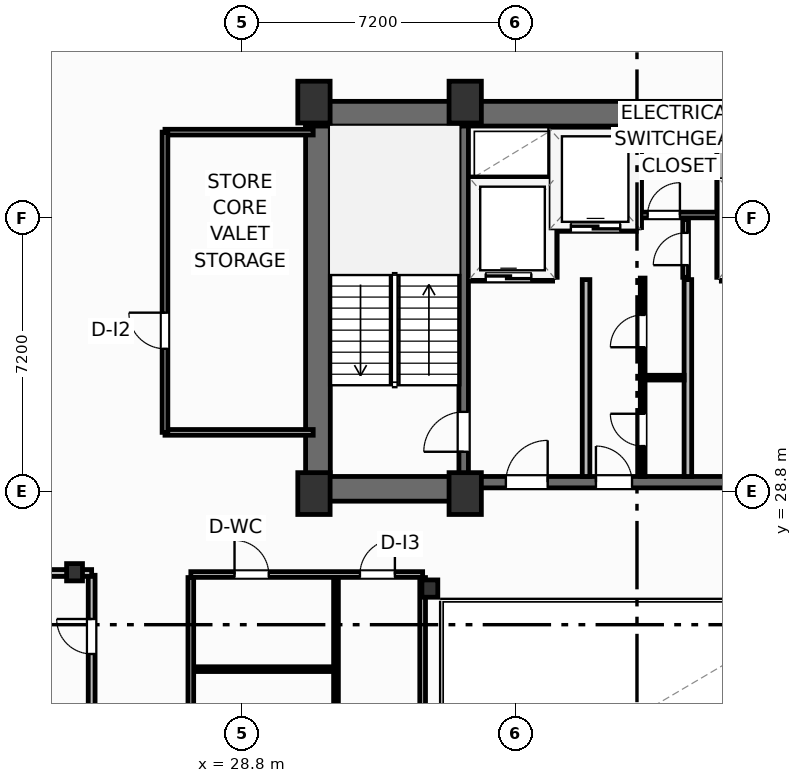
"""IFC4 building model, lengths in metres.
Left out: names, types, materials, properties, quantities, classifications, styles, units other than length and angle.
Written with IfcOpenShell. Run it as: python <this file> out.ifc"""

import sys

from ifc_helpers import new_model, si_unit, direction, frame, frame_2d, origin, origin_2d, place, context, subcontext, project, spatial, rectangle, i_section, extrude, element, fill, save


model = new_model("IFC4")
c1 = context("Model", 3, precision=1e-05, world=origin(), true_north=direction((0.0, 1.0)))
c2 = subcontext(c1, "Body", "Model", "MODEL_VIEW")
j1 = project(units=[si_unit("LENGTHUNIT", "METRE"), si_unit("PLANEANGLEUNIT", "RADIAN")], contexts=[c1])
p1 = place(None, origin())
s1 = spatial("IfcSite", under=j1, at=p1, CompositionType="ELEMENT")
p2 = place(p1, origin())
s2 = spatial("IfcBuilding", under=s1, at=p2, CompositionType="ELEMENT")
p3 = place(p2, frame((0.0, 0.0, 185.7)))
s3 = spatial("IfcBuildingStorey", under=s2, at=p3, CompositionType="ELEMENT", Elevation=185.7)
for number, where, z_axis, x_axis in (
    (1, (30.7, 28.75, 0.0), (0.0, 0.0, 1.0), (1.0, 0.0, 0.0)),
    (2, (34.68, 28.75, 0.0), (0.0, 0.0, 1.0), (1.0, 0.0, 0.0)),
    (3, (30.7, 39.05, 0.0), (0.0, 0.0, 1.0), (1.0, 0.0, 0.0)),
    (4, (34.68, 39.05, 0.0), (0.0, 0.0, 1.0), (1.0, 0.0, 0.0)),
):
    element("IfcColumn", number, at=place(p3, frame(where, z_axis=z_axis, x_axis=x_axis)), inside=s3, PredefinedType="COLUMN", context=c2, shape_type="SweptSolid", body=[
        extrude(rectangle(XDim=0.85, YDim=1.1, at=origin_2d()), origin(), (0.0, 0.0, 1.0), 3.7),
    ])
for number, where, z_axis, x_axis in (
    (5, (33.75, 26.25, 0.0), (0.0, 0.0, 1.0), (1.0, 0.0, 0.0)),
    (6, (24.4, 26.68, 0.0), (0.0, 0.0, 1.0), (1.0, 0.0, 0.0)),
):
    element("IfcColumn", number, at=place(p3, frame(where, z_axis=z_axis, x_axis=x_axis)), inside=s3, PredefinedType="COLUMN", context=c2, shape_type="SweptSolid", body=[
        extrude(i_section(OverallWidth=0.418, OverallDepth=0.455, WebThickness=0.042, FlangeThickness=0.068, FilletRadius=0.025, at=origin_2d()), origin(), (0.0, 0.0, 1.0), 3.7),
    ])
p4 = place(p3, frame((30.48, 38.745, 0.0), z_axis=(0.0, 0.0, 1.0), x_axis=(1.0, 0.0, 0.0)))
e7 = element("IfcWall", 7, at=p4, inside=s3, PredefinedType="SHEAR", context=c2, shape_type="SweptSolid", body=[
    extrude(rectangle(XDim=17.44, YDim=0.65, at=frame_2d((8.72, 0.0))), origin(), (0.0, 0.0, 1.0), 3.45),
])
p5 = place(p3, frame((30.805, 29.2, 0.0), z_axis=(0.0, 0.0, 1.0), x_axis=(0.0, 1.0, 0.0)))
e8 = element("IfcWall", 8, at=p5, inside=s3, PredefinedType="SHEAR", context=c2, shape_type="SweptSolid", body=[
    extrude(rectangle(XDim=9.22, YDim=0.65, at=frame_2d((4.61, 0.0))), origin(), (0.0, 0.0, 1.0), 3.45),
])
p6 = place(p3, frame((30.48, 28.875, 0.0), z_axis=(0.0, 0.0, 1.0), x_axis=(1.0, 0.0, 0.0)))
e9 = element("IfcWall", 9, at=p6, inside=s3, PredefinedType="SHEAR", context=c2, shape_type="SweptSolid", body=[
    extrude(rectangle(XDim=4.32, YDim=0.65, at=frame_2d((2.16, 0.0))), origin(), (0.0, 0.0, 1.0), 3.45),
])
p7 = place(p3, frame((34.8, 29.05, 0.0), z_axis=(0.0, 0.0, 1.0), x_axis=(1.0, 0.0, 0.0)))
e10 = element("IfcWall", 10, at=p7, inside=s3, PredefinedType="SHEAR", context=c2, shape_type="SweptSolid", body=[
    extrude(rectangle(XDim=8.8, YDim=0.3, at=frame_2d((4.4, 0.0))), origin(), (0.0, 0.0, 1.0), 3.45),
])
p8 = place(p7, frame((0.95, 0.0, 0.0)))
e11 = element("IfcOpeningElement", 11, at=p8, cuts=e10, PredefinedType="OPENING", context=c2, shape_type="SweptSolid", body=[
    extrude(rectangle(XDim=1.1, YDim=2.15, at=frame_2d((0.55, 1.075))), frame((0.0, 0.16, 0.0), z_axis=(0.0, -1.0, 0.0), x_axis=(1.0, 0.0, 0.0)), (0.0, 0.0, 1.0), 0.32),
])
p9 = place(p7, frame((6.75, 0.0, 0.0)))
e12 = element("IfcOpeningElement", 12, at=p9, cuts=e10, PredefinedType="OPENING", context=c2, shape_type="SweptSolid", body=[
    extrude(rectangle(XDim=1.1, YDim=2.15, at=frame_2d((0.55, 1.075))), frame((0.0, 0.16, 0.0), z_axis=(0.0, -1.0, 0.0), x_axis=(1.0, 0.0, 0.0)), (0.0, 0.0, 1.0), 0.32),
])
p10 = place(p7, frame((3.32, 0.0, 0.0)))
e13 = element("IfcOpeningElement", 13, at=p10, cuts=e10, PredefinedType="OPENING", context=c2, shape_type="SweptSolid", body=[
    extrude(rectangle(XDim=0.95, YDim=2.15, at=frame_2d((0.475, 1.075))), frame((0.0, 0.16, 0.0), z_axis=(0.0, -1.0, 0.0), x_axis=(1.0, 0.0, 0.0)), (0.0, 0.0, 1.0), 0.32),
])
p11 = place(p3, frame((34.64, 29.2, 0.0), z_axis=(0.0, 0.0, 1.0), x_axis=(0.0, 1.0, 0.0)))
e14 = element("IfcWall", 14, at=p11, inside=s3, PredefinedType="SHEAR", context=c2, shape_type="SweptSolid", body=[
    extrude(rectangle(XDim=9.22, YDim=0.25, at=frame_2d((4.61, 0.0))), origin(), (0.0, 0.0, 1.0), 3.45),
])
p12 = place(p11, frame((0.65, 0.0, 0.0)))
e15 = element("IfcOpeningElement", 15, at=p12, cuts=e14, PredefinedType="OPENING", context=c2, shape_type="SweptSolid", body=[
    extrude(rectangle(XDim=1.05, YDim=2.15, at=frame_2d((0.525, 1.075))), frame((0.0, 0.135, 0.0), z_axis=(0.0, -1.0, 0.0), x_axis=(1.0, 0.0, 0.0)), (0.0, 0.0, 1.0), 0.27),
])
p13 = place(p3, frame((24.85, 23.03, 0.0), z_axis=(0.0, 0.0, 1.0), x_axis=(0.0, 1.0, 0.0)))
e16 = element("IfcWall", 16, at=p13, inside=s3, PredefinedType="PARTITIONING", context=c2, shape_type="SweptSolid", body=[
    extrude(rectangle(XDim=3.57, YDim=0.18, at=frame_2d((1.785, 0.0))), origin(), (0.0, 0.0, 1.0), 3.45),
])
p14 = place(p13, frame((1.5, 0.0, 0.0)))
e17 = element("IfcOpeningElement", 17, at=p14, cuts=e16, PredefinedType="OPENING", context=c2, shape_type="SweptSolid", body=[
    extrude(rectangle(XDim=0.92, YDim=2.05, at=frame_2d((0.46, 1.025))), frame((0.0, 0.1, 0.0), z_axis=(0.0, -1.0, 0.0), x_axis=(1.0, 0.0, 0.0)), (0.0, 0.0, 1.0), 0.2),
])
p15 = place(p3, frame((3.658, 26.66, 0.0), z_axis=(0.0, 0.0, 1.0), x_axis=(1.0, 0.0, 0.0)))
e18 = element("IfcWall", 18, at=p15, inside=s3, PredefinedType="PARTITIONING", context=c2, shape_type="SweptSolid", body=[
    extrude(rectangle(XDim=21.192, YDim=0.18, at=frame_2d((10.596, 0.0))), origin(), (0.0, 0.0, 1.0), 2.662),
])
for number, where, z_axis, x_axis in (
    (19, (37.86, 29.2, 0.0), (0.0, 0.0, 1.0), (0.0, 1.0, 0.0)),
    (20, (40.54, 29.2, 0.0), (0.0, 0.0, 1.0), (0.0, 1.0, 0.0)),
):
    element("IfcWall", number, at=place(p3, frame(where, z_axis=z_axis, x_axis=x_axis)), inside=s3, PredefinedType="PARTITIONING", context=c2, shape_type="SweptSolid", body=[
        extrude(rectangle(XDim=5.18, YDim=0.2, at=frame_2d((2.59, 0.0))), origin(), (0.0, 0.0, 1.0), 3.45),
    ])
p16 = place(p3, frame((34.8, 34.44, 0.0), z_axis=(0.0, 0.0, 1.0), x_axis=(1.0, 0.0, 0.0)))
e21 = element("IfcWall", 21, at=p16, inside=s3, PredefinedType="PARTITIONING", context=c2, shape_type="SweptSolid", body=[
    extrude(rectangle(XDim=2.18, YDim=0.2, at=frame_2d((1.09, 0.0))), origin(), (0.0, 0.0, 1.0), 3.45),
])
p17 = place(p16, frame((0.42, 0.0, 0.0)))
e22 = element("IfcOpeningElement", 22, at=p17, cuts=e21, PredefinedType="OPENING", context=c2, shape_type="SweptSolid", body=[
    extrude(rectangle(XDim=1.2, YDim=2.2, at=frame_2d((0.6, 1.1))), frame((0.0, 0.11, 0.0), z_axis=(0.0, -1.0, 0.0), x_axis=(1.0, 0.0, 0.0)), (0.0, 0.0, 1.0), 0.22),
])
p18 = place(p3, frame((34.8, 36.98, 0.0), z_axis=(0.0, 0.0, 1.0), x_axis=(1.0, 0.0, 0.0)))
e23 = element("IfcWall", 23, at=p18, inside=s3, PredefinedType="PARTITIONING", context=c2, shape_type="SweptSolid", body=[
    extrude(rectangle(XDim=2.18, YDim=0.2, at=frame_2d((1.09, 0.0))), origin(), (0.0, 0.0, 1.0), 3.45),
])
for number, where, z_axis, x_axis in (
    (24, (37.0, 34.44, 0.0), (0.0, 0.0, 1.0), (0.0, 1.0, 0.0)),
    (25, (41.4, 34.44, 0.0), (0.0, 0.0, 1.0), (0.0, 1.0, 0.0)),
):
    element("IfcWall", number, at=place(p3, frame(where, z_axis=z_axis, x_axis=x_axis)), inside=s3, PredefinedType="PARTITIONING", context=c2, shape_type="SweptSolid", body=[
        extrude(rectangle(XDim=3.9, YDim=0.2, at=frame_2d((1.95, 0.0))), origin(), (0.0, 0.0, 1.0), 3.45),
    ])
p19 = place(p3, frame((37.06, 35.75, 0.0), z_axis=(0.0, 0.0, 1.0), x_axis=(1.0, 0.0, 0.0)))
e26 = element("IfcWall", 26, at=p19, inside=s3, PredefinedType="PARTITIONING", context=c2, shape_type="SweptSolid", body=[
    extrude(rectangle(XDim=2.12, YDim=0.2, at=frame_2d((1.06, 0.0))), origin(), (0.0, 0.0, 1.0), 3.45),
])
p20 = place(p19, frame((0.4, 0.0, 0.0)))
e27 = element("IfcOpeningElement", 27, at=p20, cuts=e26, PredefinedType="OPENING", context=c2, shape_type="SweptSolid", body=[
    extrude(rectangle(XDim=1.3, YDim=2.2, at=frame_2d((0.65, 1.1))), frame((0.0, 0.11, 0.0), z_axis=(0.0, -1.0, 0.0), x_axis=(1.0, 0.0, 0.0)), (0.0, 0.0, 1.0), 0.22),
])
p21 = place(p3, frame((39.22, 35.75, 0.0), z_axis=(0.0, 0.0, 1.0), x_axis=(0.0, 1.0, 0.0)))
e28 = element("IfcWall", 28, at=p21, inside=s3, PredefinedType="PARTITIONING", context=c2, shape_type="SweptSolid", body=[
    extrude(rectangle(XDim=2.59, YDim=0.2, at=frame_2d((1.295, 0.0))), origin(), (0.0, 0.0, 1.0), 3.45),
])
p22 = place(p3, frame((39.3, 36.08, 0.0), z_axis=(0.0, 0.0, 1.0), x_axis=(1.0, 0.0, 0.0)))
e29 = element("IfcWall", 29, at=p22, inside=s3, PredefinedType="PARTITIONING", context=c2, shape_type="SweptSolid", body=[
    extrude(rectangle(XDim=2.02, YDim=0.15, at=frame_2d((1.01, 0.0))), origin(), (0.0, 0.0, 1.0), 3.45),
])
p23 = place(p22, frame((0.18, 0.0, 0.0)))
e30 = element("IfcOpeningElement", 30, at=p23, cuts=e29, PredefinedType="OPENING", context=c2, shape_type="SweptSolid", body=[
    extrude(rectangle(XDim=0.85, YDim=2.05, at=frame_2d((0.425, 1.025))), frame((0.0, 0.085, 0.0), z_axis=(0.0, -1.0, 0.0), x_axis=(1.0, 0.0, 0.0)), (0.0, 0.0, 1.0), 0.17),
])
p24 = place(p3, frame((40.48, 34.44, 0.0), z_axis=(0.0, 0.0, 1.0), x_axis=(0.0, 1.0, 0.0)))
e31 = element("IfcWall", 31, at=p24, inside=s3, PredefinedType="PARTITIONING", context=c2, shape_type="SweptSolid", body=[
    extrude(rectangle(XDim=1.52, YDim=0.15, at=frame_2d((0.76, 0.0))), origin(), (0.0, 0.0, 1.0), 3.45),
])
p25 = place(p24, frame((0.32, 0.0, 0.0)))
e32 = element("IfcOpeningElement", 32, at=p25, cuts=e31, PredefinedType="OPENING", context=c2, shape_type="SweptSolid", body=[
    extrude(rectangle(XDim=0.85, YDim=2.05, at=frame_2d((0.425, 1.025))), frame((0.0, 0.085, 0.0), z_axis=(0.0, -1.0, 0.0), x_axis=(1.0, 0.0, 0.0)), (0.0, 0.0, 1.0), 0.17),
])
p26 = place(p3, frame((39.35, 31.8, 0.0), z_axis=(0.0, 0.0, 1.0), x_axis=(1.0, 0.0, 0.0)))
e33 = element("IfcWall", 33, at=p26, inside=s3, PredefinedType="PARTITIONING", context=c2, shape_type="SweptSolid", body=[
    extrude(rectangle(XDim=1.09, YDim=0.125, at=frame_2d((0.545, 0.0))), origin(), (0.0, 0.0, 1.0), 3.45),
])
p27 = place(p3, frame((39.35, 29.2, 0.0), z_axis=(0.0, 0.0, 1.0), x_axis=(0.0, 1.0, 0.0)))
e34 = element("IfcWall", 34, at=p27, inside=s3, PredefinedType="PARTITIONING", context=c2, shape_type="SweptSolid", body=[
    extrude(rectangle(XDim=5.22, YDim=0.125, at=frame_2d((2.61, 0.0))), origin(), (0.0, 0.0, 1.0), 3.45),
])
p28 = place(p27, frame((0.8, 0.0, 0.0)))
e35 = element("IfcOpeningElement", 35, at=p28, cuts=e34, PredefinedType="OPENING", context=c2, shape_type="SweptSolid", body=[
    extrude(rectangle(XDim=0.85, YDim=2.05, at=frame_2d((0.425, 1.025))), frame((0.0, 0.073, 0.0), z_axis=(0.0, -1.0, 0.0), x_axis=(1.0, 0.0, 0.0)), (0.0, 0.0, 1.0), 0.145),
])
p29 = place(p27, frame((3.4, 0.0, 0.0)))
e36 = element("IfcOpeningElement", 36, at=p29, cuts=e34, PredefinedType="OPENING", context=c2, shape_type="SweptSolid", body=[
    extrude(rectangle(XDim=0.85, YDim=2.05, at=frame_2d((0.425, 1.025))), frame((0.0, 0.073, 0.0), z_axis=(0.0, -1.0, 0.0), x_axis=(1.0, 0.0, 0.0)), (0.0, 0.0, 1.0), 0.145),
])
p30 = place(p3, frame((27.46, 26.62, 0.0), z_axis=(0.0, 0.0, 1.0), x_axis=(1.0, 0.0, 0.0)))
e37 = element("IfcWall", 37, at=p30, inside=s3, PredefinedType="PARTITIONING", context=c2, shape_type="SweptSolid", body=[
    extrude(rectangle(XDim=6.1, YDim=0.15, at=frame_2d((3.05, 0.0))), origin(), (0.0, 0.0, 1.0), 2.662),
])
p31 = place(p30, frame((1.15, 0.0, 0.0)))
e38 = element("IfcOpeningElement", 38, at=p31, cuts=e37, PredefinedType="OPENING", context=c2, shape_type="SweptSolid", body=[
    extrude(rectangle(XDim=0.9, YDim=2.05, at=frame_2d((0.45, 1.025))), frame((0.0, 0.085, 0.0), z_axis=(0.0, -1.0, 0.0), x_axis=(1.0, 0.0, 0.0)), (0.0, 0.0, 1.0), 0.17),
])
p32 = place(p30, frame((4.45, 0.0, 0.0)))
e39 = element("IfcOpeningElement", 39, at=p32, cuts=e37, PredefinedType="OPENING", context=c2, shape_type="SweptSolid", body=[
    extrude(rectangle(XDim=0.92, YDim=2.05, at=frame_2d((0.46, 1.025))), frame((0.0, 0.085, 0.0), z_axis=(0.0, -1.0, 0.0), x_axis=(1.0, 0.0, 0.0)), (0.0, 0.0, 1.0), 0.17),
])
p33 = place(p3, frame((31.28, 19.38, 0.0), z_axis=(0.0, 0.0, 1.0), x_axis=(0.0, 1.0, 0.0)))
e40 = element("IfcWall", 40, at=p33, inside=s3, PredefinedType="PARTITIONING", context=c2, shape_type="SweptSolid", body=[
    extrude(rectangle(XDim=7.16, YDim=0.125, at=frame_2d((3.58, 0.0))), origin(), (0.0, 0.0, 1.0), 3.45),
])
p34 = place(p3, frame((27.52, 24.13, 0.0), z_axis=(0.0, 0.0, 1.0), x_axis=(1.0, 0.0, 0.0)))
e41 = element("IfcWall", 41, at=p34, inside=s3, PredefinedType="PARTITIONING", context=c2, shape_type="SweptSolid", body=[
    extrude(rectangle(XDim=3.7, YDim=0.125, at=frame_2d((1.85, 0.0))), origin(), (0.0, 0.0, 1.0), 3.45),
])
p35 = place(p3, frame((27.46, 19.38, 0.0), z_axis=(0.0, 0.0, 1.0), x_axis=(0.0, 1.0, 0.0)))
e42 = element("IfcWall", 42, at=p35, inside=s3, PredefinedType="PARTITIONING", context=c2, shape_type="SweptSolid", body=[
    extrude(rectangle(XDim=7.16, YDim=0.15, at=frame_2d((3.58, 0.0))), origin(), (0.0, 0.0, 1.0), 3.45),
])
p36 = place(p35, frame((1.4, 0.0, 0.0)))
e43 = element("IfcOpeningElement", 43, at=p36, cuts=e42, PredefinedType="OPENING", context=c2, shape_type="SweptSolid", body=[
    extrude(rectangle(XDim=0.95, YDim=2.05, at=frame_2d((0.475, 1.025))), frame((0.0, 0.085, 0.0), z_axis=(0.0, -1.0, 0.0), x_axis=(1.0, 0.0, 0.0)), (0.0, 0.0, 1.0), 0.17),
])
p37 = place(p3, frame((33.56, 19.38, 0.0), z_axis=(0.0, 0.0, 1.0), x_axis=(0.0, 1.0, 0.0)))
e44 = element("IfcWall", 44, at=p37, inside=s3, PredefinedType="PARTITIONING", context=c2, shape_type="SweptSolid", body=[
    extrude(rectangle(XDim=7.16, YDim=0.15, at=frame_2d((3.58, 0.0))), origin(), (0.0, 0.0, 1.0), 2.824),
])
for number, where, z_axis, x_axis in (
    (45, (26.78, 30.36, 0.0), (0.0, 0.0, 1.0), (1.0, 0.0, 0.0)),
    (46, (26.78, 38.26, 0.0), (0.0, 0.0, 1.0), (1.0, 0.0, 0.0)),
):
    element("IfcWall", number, at=place(p3, frame(where, z_axis=z_axis, x_axis=x_axis)), inside=s3, PredefinedType="PARTITIONING", context=c2, shape_type="SweptSolid", body=[
        extrude(rectangle(XDim=3.9, YDim=0.15, at=frame_2d((1.95, 0.0))), origin(), (0.0, 0.0, 1.0), 3.45),
    ])
p38 = place(p3, frame((26.78, 30.36, 0.0), z_axis=(0.0, 0.0, 1.0), x_axis=(0.0, 1.0, 0.0)))
e47 = element("IfcWall", 47, at=p38, inside=s3, PredefinedType="PARTITIONING", context=c2, shape_type="SweptSolid", body=[
    extrude(rectangle(XDim=7.9, YDim=0.15, at=frame_2d((3.95, 0.0))), origin(), (0.0, 0.0, 1.0), 3.45),
])
p39 = place(p38, frame((2.2, 0.0, 0.0)))
e48 = element("IfcOpeningElement", 48, at=p39, cuts=e47, PredefinedType="OPENING", context=c2, shape_type="SweptSolid", body=[
    extrude(rectangle(XDim=0.95, YDim=2.05, at=frame_2d((0.475, 1.025))), frame((0.0, 0.085, 0.0), z_axis=(0.0, -1.0, 0.0), x_axis=(1.0, 0.0, 0.0)), (0.0, 0.0, 1.0), 0.17),
])
p40 = place(p14, origin())
e49 = element("IfcDoor", 49, at=p40, inside=s3, OperationType="SINGLE_SWING_RIGHT", PredefinedType="DOOR", context=c2, shape_type="SweptSolid", body=[
    extrude(rectangle(XDim=0.92, YDim=2.05, at=frame_2d((0.46, 1.025))), frame((0.0, 0.025, 0.0), z_axis=(0.0, -1.0, 0.0), x_axis=(1.0, 0.0, 0.0)), (0.0, 0.0, 1.0), 0.05),
])
fill(e17, e49)
p41 = place(p12, origin())
e50 = element("IfcDoor", 50, at=p41, inside=s3, OperationType="SINGLE_SWING_LEFT", PredefinedType="DOOR", context=c2, shape_type="SweptSolid", body=[
    extrude(rectangle(XDim=1.05, YDim=2.15, at=frame_2d((0.525, 1.075))), frame((0.0, 0.025, 0.0), z_axis=(0.0, -1.0, 0.0), x_axis=(1.0, 0.0, 0.0)), (0.0, 0.0, 1.0), 0.05),
])
fill(e15, e50)
p42 = place(p8, origin())
e51 = element("IfcDoor", 51, at=p42, inside=s3, OperationType="SINGLE_SWING_RIGHT", PredefinedType="DOOR", context=c2, shape_type="SweptSolid", body=[
    extrude(rectangle(XDim=1.1, YDim=2.15, at=frame_2d((0.55, 1.075))), frame((0.0, 0.025, 0.0), z_axis=(0.0, -1.0, 0.0), x_axis=(1.0, 0.0, 0.0)), (0.0, 0.0, 1.0), 0.05),
])
fill(e11, e51)
p43 = place(p17, origin())
e52 = element("IfcDoor", 52, at=p43, inside=s3, OperationType="SLIDING_TO_LEFT", PredefinedType="DOOR", context=c2, shape_type="SweptSolid", body=[
    extrude(rectangle(XDim=1.2, YDim=2.2, at=frame_2d((0.6, 1.1))), frame((0.0, 0.025, 0.0), z_axis=(0.0, -1.0, 0.0), x_axis=(1.0, 0.0, 0.0)), (0.0, 0.0, 1.0), 0.05),
])
fill(e22, e52)
p44 = place(p20, origin())
e53 = element("IfcDoor", 53, at=p44, inside=s3, OperationType="SLIDING_TO_LEFT", PredefinedType="DOOR", context=c2, shape_type="SweptSolid", body=[
    extrude(rectangle(XDim=1.3, YDim=2.2, at=frame_2d((0.65, 1.1))), frame((0.0, 0.025, 0.0), z_axis=(0.0, -1.0, 0.0), x_axis=(1.0, 0.0, 0.0)), (0.0, 0.0, 1.0), 0.05),
])
fill(e27, e53)
p45 = place(p23, origin())
e54 = element("IfcDoor", 54, at=p45, inside=s3, OperationType="SINGLE_SWING_RIGHT", PredefinedType="DOOR", context=c2, shape_type="SweptSolid", body=[
    extrude(rectangle(XDim=0.85, YDim=2.05, at=frame_2d((0.425, 1.025))), frame((0.0, 0.025, 0.0), z_axis=(0.0, -1.0, 0.0), x_axis=(1.0, 0.0, 0.0)), (0.0, 0.0, 1.0), 0.05),
])
fill(e30, e54)
p46 = place(p25, origin())
e55 = element("IfcDoor", 55, at=p46, inside=s3, OperationType="SINGLE_SWING_LEFT", PredefinedType="DOOR", context=c2, shape_type="SweptSolid", body=[
    extrude(rectangle(XDim=0.85, YDim=2.05, at=frame_2d((0.425, 1.025))), frame((0.0, 0.025, 0.0), z_axis=(0.0, -1.0, 0.0), x_axis=(1.0, 0.0, 0.0)), (0.0, 0.0, 1.0), 0.05),
])
fill(e32, e55)
p47 = place(p28, origin())
e56 = element("IfcDoor", 56, at=p47, inside=s3, OperationType="SINGLE_SWING_RIGHT", PredefinedType="DOOR", context=c2, shape_type="SweptSolid", body=[
    extrude(rectangle(XDim=0.85, YDim=2.05, at=frame_2d((0.425, 1.025))), frame((0.0, 0.025, 0.0), z_axis=(0.0, -1.0, 0.0), x_axis=(1.0, 0.0, 0.0)), (0.0, 0.0, 1.0), 0.05),
])
fill(e35, e56)
p48 = place(p29, origin())
e57 = element("IfcDoor", 57, at=p48, inside=s3, OperationType="SINGLE_SWING_LEFT", PredefinedType="DOOR", context=c2, shape_type="SweptSolid", body=[
    extrude(rectangle(XDim=0.85, YDim=2.05, at=frame_2d((0.425, 1.025))), frame((0.0, 0.025, 0.0), z_axis=(0.0, -1.0, 0.0), x_axis=(1.0, 0.0, 0.0)), (0.0, 0.0, 1.0), 0.05),
])
fill(e36, e57)
p49 = place(p10, origin())
e58 = element("IfcDoor", 58, at=p49, inside=s3, OperationType="SINGLE_SWING_LEFT", PredefinedType="DOOR", context=c2, shape_type="SweptSolid", body=[
    extrude(rectangle(XDim=0.95, YDim=2.15, at=frame_2d((0.475, 1.075))), frame((0.0, 0.025, 0.0), z_axis=(0.0, -1.0, 0.0), x_axis=(1.0, 0.0, 0.0)), (0.0, 0.0, 1.0), 0.05),
])
fill(e13, e58)
p50 = place(p31, origin())
e59 = element("IfcDoor", 59, at=p50, inside=s3, OperationType="SINGLE_SWING_LEFT", PredefinedType="DOOR", context=c2, shape_type="SweptSolid", body=[
    extrude(rectangle(XDim=0.9, YDim=2.05, at=frame_2d((0.45, 1.025))), frame((0.0, 0.025, 0.0), z_axis=(0.0, -1.0, 0.0), x_axis=(1.0, 0.0, 0.0)), (0.0, 0.0, 1.0), 0.05),
])
fill(e38, e59)
p51 = place(p32, origin())
e60 = element("IfcDoor", 60, at=p51, inside=s3, OperationType="SINGLE_SWING_RIGHT", PredefinedType="DOOR", context=c2, shape_type="SweptSolid", body=[
    extrude(rectangle(XDim=0.92, YDim=2.05, at=frame_2d((0.46, 1.025))), frame((0.0, 0.025, 0.0), z_axis=(0.0, -1.0, 0.0), x_axis=(1.0, 0.0, 0.0)), (0.0, 0.0, 1.0), 0.05),
])
fill(e39, e60)
p52 = place(p39, origin())
e61 = element("IfcDoor", 61, at=p52, inside=s3, OperationType="SINGLE_SWING_RIGHT", PredefinedType="DOOR", context=c2, shape_type="SweptSolid", body=[
    extrude(rectangle(XDim=0.95, YDim=2.05, at=frame_2d((0.475, 1.025))), frame((0.0, 0.025, 0.0), z_axis=(0.0, -1.0, 0.0), x_axis=(1.0, 0.0, 0.0)), (0.0, 0.0, 1.0), 0.05),
])
fill(e48, e61)
save(model, sys.argv[1])
